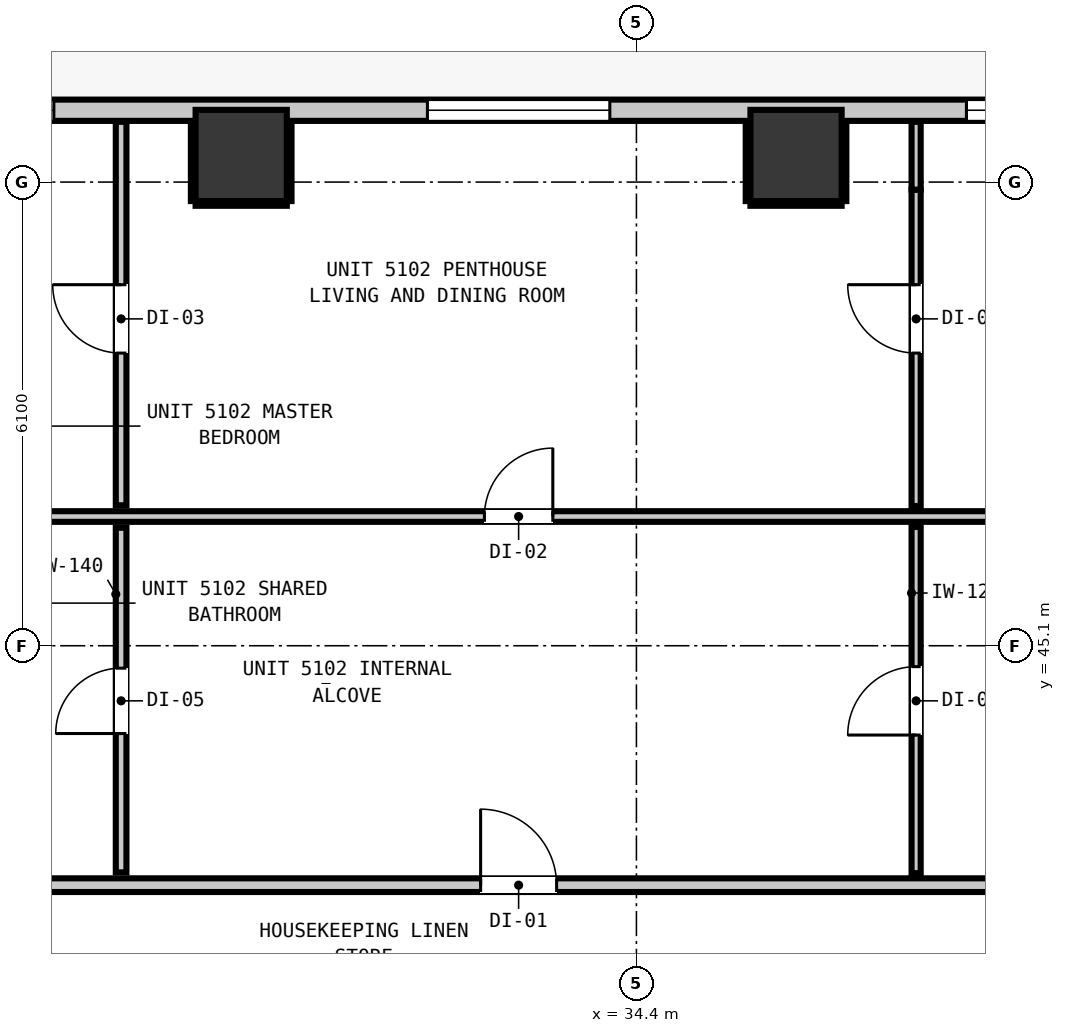
"""IFC4 building model, lengths in metres.
Left out: names, types, materials, properties, quantities, classifications, styles, units other than length and angle.
Written with IfcOpenShell. Run it as: python <this file> out.ifc"""

import sys

from ifc_helpers import new_model, si_unit, direction, frame, frame_2d, origin, origin_2d, place, context, subcontext, project, spatial, rectangle, extrude, element, fill, save


model = new_model("IFC4")
c1 = context("Model", 3, precision=1e-05, world=origin(), true_north=direction((0.0, 1.0)))
c2 = subcontext(c1, "Body", "Model", "MODEL_VIEW")
j1 = project(units=[si_unit("LENGTHUNIT", "METRE"), si_unit("PLANEANGLEUNIT", "RADIAN")], contexts=[c1])
p1 = place(None, origin())
s1 = spatial("IfcSite", under=j1, at=p1, CompositionType="ELEMENT")
p2 = place(p1, origin())
s2 = spatial("IfcBuilding", under=s1, at=p2, CompositionType="ELEMENT")
p3 = place(p2, frame((0.0, 0.0, 176.88)))
s3 = spatial("IfcBuildingStorey", under=s2, at=p3, CompositionType="ELEMENT", Elevation=176.88)
for number, where, z_axis, x_axis in (
    (1, (29.2, 51.55, 0.0), (0.0, 0.0, 1.0), (1.0, 0.0, 0.0)),
    (2, (36.5, 51.55, 0.0), (0.0, 0.0, 1.0), (1.0, 0.0, 0.0)),
):
    element("IfcColumn", number, at=place(p3, frame(where, z_axis=z_axis, x_axis=x_axis)), inside=s3, PredefinedType="COLUMN", context=c2, shape_type="SweptSolid", body=[
        extrude(rectangle(XDim=1.2, YDim=1.2, at=origin_2d()), origin(), (0.0, 0.0, 1.0), 3.32),
    ])
p4 = place(p3, frame((5.355, 52.145, 0.0), z_axis=(0.0, 0.0, 1.0), x_axis=(1.0, 0.0, 0.0)))
e3 = element("IfcWall", 3, at=p4, inside=s3, PredefinedType="STANDARD", context=c2, shape_type="SweptSolid", body=[
    extrude(rectangle(XDim=35.09, YDim=0.28, at=frame_2d((17.545, 0.0))), origin(), (0.0, 0.0, 1.0), 3.08),
])
p5 = place(p4, frame((0.904, 0.0, 0.0)))
e4 = element("IfcOpeningElement", 4, at=p5, cuts=e3, PredefinedType="OPENING", context=c2, shape_type="SweptSolid", body=[
    extrude(rectangle(XDim=1.0, YDim=2.15, at=frame_2d((0.5, 1.075))), frame((0.0, 0.15, 0.0), z_axis=(0.0, -1.0, 0.0), x_axis=(1.0, 0.0, 0.0)), (0.0, 0.0, 1.0), 0.3),
])
p6 = place(p4, frame((3.817, 0.0, 0.85)))
e5 = element("IfcOpeningElement", 5, at=p6, cuts=e3, PredefinedType="OPENING", context=c2, shape_type="SweptSolid", body=[
    extrude(rectangle(XDim=2.4, YDim=1.95, at=frame_2d((1.2, 0.975))), frame((0.0, 0.15, 0.0), z_axis=(0.0, -1.0, 0.0), x_axis=(1.0, 0.0, 0.0)), (0.0, 0.0, 1.0), 0.3),
])
p7 = place(p4, frame((16.495, 0.0, 0.85)))
e6 = element("IfcOpeningElement", 6, at=p7, cuts=e3, PredefinedType="OPENING", context=c2, shape_type="SweptSolid", body=[
    extrude(rectangle(XDim=2.4, YDim=1.95, at=frame_2d((1.2, 0.975))), frame((0.0, 0.15, 0.0), z_axis=(0.0, -1.0, 0.0), x_axis=(1.0, 0.0, 0.0)), (0.0, 0.0, 1.0), 0.3),
])
p8 = place(p4, frame((26.295, 0.0, 0.85)))
e7 = element("IfcOpeningElement", 7, at=p8, cuts=e3, PredefinedType="OPENING", context=c2, shape_type="SweptSolid", body=[
    extrude(rectangle(XDim=2.4, YDim=1.95, at=frame_2d((1.2, 0.975))), frame((0.0, 0.15, 0.0), z_axis=(0.0, -1.0, 0.0), x_axis=(1.0, 0.0, 0.0)), (0.0, 0.0, 1.0), 0.3),
])
p9 = place(p4, frame((20.33, 0.0, 0.85)))
e8 = element("IfcOpeningElement", 8, at=p9, cuts=e3, PredefinedType="OPENING", context=c2, shape_type="SweptSolid", body=[
    extrude(rectangle(XDim=1.05, YDim=1.65, at=frame_2d((0.525, 0.825))), frame((0.0, 0.15, 0.0), z_axis=(0.0, -1.0, 0.0), x_axis=(1.0, 0.0, 0.0)), (0.0, 0.0, 1.0), 0.3),
])
p10 = place(p4, frame((33.387, 0.0, 0.85)))
e9 = element("IfcOpeningElement", 9, at=p10, cuts=e3, PredefinedType="OPENING", context=c2, shape_type="SweptSolid", body=[
    extrude(rectangle(XDim=1.05, YDim=1.65, at=frame_2d((0.525, 0.825))), frame((0.0, 0.15, 0.0), z_axis=(0.0, -1.0, 0.0), x_axis=(1.0, 0.0, 0.0)), (0.0, 0.0, 1.0), 0.3),
])
p11 = place(p3, frame((3.207, 41.95, 0.0), z_axis=(0.0, 0.0, 1.0), x_axis=(1.0, 0.0, 0.0)))
e10 = element("IfcWall", 10, at=p11, inside=s3, PredefinedType="PARTITIONING", context=c2, shape_type="SweptSolid", body=[
    extrude(rectangle(XDim=39.386, YDim=0.18, at=frame_2d((19.693, 0.0))), origin(), (0.0, 0.0, 1.0), 3.08),
])
p12 = place(p11, frame((9.55, 0.0, 0.0)))
e11 = element("IfcOpeningElement", 11, at=p12, cuts=e10, PredefinedType="OPENING", context=c2, shape_type="SweptSolid", body=[
    extrude(rectangle(XDim=1.0, YDim=2.15, at=frame_2d((0.5, 1.075))), frame((0.0, 0.1, 0.0), z_axis=(0.0, -1.0, 0.0), x_axis=(1.0, 0.0, 0.0)), (0.0, 0.0, 1.0), 0.2),
])
p13 = place(p11, frame((29.143, 0.0, 0.0)))
e12 = element("IfcOpeningElement", 12, at=p13, cuts=e10, PredefinedType="OPENING", context=c2, shape_type="SweptSolid", body=[
    extrude(rectangle(XDim=1.0, YDim=2.15, at=frame_2d((0.5, 1.075))), frame((0.0, 0.1, 0.0), z_axis=(0.0, -1.0, 0.0), x_axis=(1.0, 0.0, 0.0)), (0.0, 0.0, 1.0), 0.2),
])
p14 = place(p3, frame((3.207, 46.8, 0.0), z_axis=(0.0, 0.0, 1.0), x_axis=(1.0, 0.0, 0.0)))
e13 = element("IfcWall", 13, at=p14, inside=s3, PredefinedType="PARTITIONING", context=c2, shape_type="SweptSolid", body=[
    extrude(rectangle(XDim=39.386, YDim=0.14, at=frame_2d((19.693, 0.0))), origin(), (0.0, 0.0, 1.0), 3.08),
])
p15 = place(p14, frame((9.6, 0.0, 0.0)))
e14 = element("IfcOpeningElement", 14, at=p15, cuts=e13, PredefinedType="OPENING", context=c2, shape_type="SweptSolid", body=[
    extrude(rectangle(XDim=0.9, YDim=2.1, at=frame_2d((0.45, 1.05))), frame((0.0, 0.08, 0.0), z_axis=(0.0, -1.0, 0.0), x_axis=(1.0, 0.0, 0.0)), (0.0, 0.0, 1.0), 0.16),
])
p16 = place(p14, frame((29.193, 0.0, 0.0)))
e15 = element("IfcOpeningElement", 15, at=p16, cuts=e13, PredefinedType="OPENING", context=c2, shape_type="SweptSolid", body=[
    extrude(rectangle(XDim=0.9, YDim=2.1, at=frame_2d((0.45, 1.05))), frame((0.0, 0.08, 0.0), z_axis=(0.0, -1.0, 0.0), x_axis=(1.0, 0.0, 0.0)), (0.0, 0.0, 1.0), 0.16),
])
p17 = place(p3, frame((27.62, 42.118, 0.0), z_axis=(0.0, 0.0, 1.0), x_axis=(0.0, 1.0, 0.0)))
e16 = element("IfcWall", 16, at=p17, inside=s3, PredefinedType="PARTITIONING", context=c2, shape_type="SweptSolid", body=[
    extrude(rectangle(XDim=4.534, YDim=0.14, at=frame_2d((2.267, 0.0))), origin(), (0.0, 0.0, 1.0), 3.08),
])
p18 = place(p17, frame((1.827, 0.0, 0.0)))
e17 = element("IfcOpeningElement", 17, at=p18, cuts=e16, PredefinedType="OPENING", context=c2, shape_type="SweptSolid", body=[
    extrude(rectangle(XDim=0.86, YDim=2.02, at=frame_2d((0.43, 1.01))), frame((0.0, 0.08, 0.0), z_axis=(0.0, -1.0, 0.0), x_axis=(1.0, 0.0, 0.0)), (0.0, 0.0, 1.0), 0.16),
])
p19 = place(p3, frame((27.62, 46.948, 0.0), z_axis=(0.0, 0.0, 1.0), x_axis=(0.0, 1.0, 0.0)))
e18 = element("IfcWall", 18, at=p19, inside=s3, PredefinedType="PARTITIONING", context=c2, shape_type="SweptSolid", body=[
    extrude(rectangle(XDim=5.045, YDim=0.14, at=frame_2d((2.522, 0.0))), origin(), (0.0, 0.0, 1.0), 3.08),
])
p20 = place(p19, frame((2.002, 0.0, 0.0)))
e19 = element("IfcOpeningElement", 19, at=p20, cuts=e18, PredefinedType="OPENING", context=c2, shape_type="SweptSolid", body=[
    extrude(rectangle(XDim=0.9, YDim=2.1, at=frame_2d((0.45, 1.05))), frame((0.0, 0.08, 0.0), z_axis=(0.0, -1.0, 0.0), x_axis=(1.0, 0.0, 0.0)), (0.0, 0.0, 1.0), 0.16),
])
p21 = place(p3, frame((38.08, 42.108, 0.0), z_axis=(0.0, 0.0, 1.0), x_axis=(0.0, 1.0, 0.0)))
e20 = element("IfcWall", 20, at=p21, inside=s3, PredefinedType="PARTITIONING", context=c2, shape_type="SweptSolid", body=[
    extrude(rectangle(XDim=4.554, YDim=0.12, at=frame_2d((2.277, 0.0))), origin(), (0.0, 0.0, 1.0), 3.08),
])
p22 = place(p21, frame((1.817, 0.0, 0.0)))
e21 = element("IfcOpeningElement", 21, at=p22, cuts=e20, PredefinedType="OPENING", context=c2, shape_type="SweptSolid", body=[
    extrude(rectangle(XDim=0.9, YDim=2.1, at=frame_2d((0.45, 1.05))), frame((0.0, 0.07, 0.0), z_axis=(0.0, -1.0, 0.0), x_axis=(1.0, 0.0, 0.0)), (0.0, 0.0, 1.0), 0.14),
])
p23 = place(p3, frame((38.08, 46.938, 0.0), z_axis=(0.0, 0.0, 1.0), x_axis=(0.0, 1.0, 0.0)))
e22 = element("IfcWall", 22, at=p23, inside=s3, PredefinedType="PARTITIONING", context=c2, shape_type="SweptSolid", body=[
    extrude(rectangle(XDim=4.162, YDim=0.12, at=frame_2d((2.081, 0.0))), origin(), (0.0, 0.0, 1.0), 2.565),
])
p24 = place(p23, frame((2.012, 0.0, 0.0)))
e23 = element("IfcOpeningElement", 23, at=p24, cuts=e22, PredefinedType="OPENING", context=c2, shape_type="SweptSolid", body=[
    extrude(rectangle(XDim=0.9, YDim=2.1, at=frame_2d((0.45, 1.05))), frame((0.0, 0.07, 0.0), z_axis=(0.0, -1.0, 0.0), x_axis=(1.0, 0.0, 0.0)), (0.0, 0.0, 1.0), 0.14),
])
p25 = place(p3, frame((38.08, 51.1, 0.0), z_axis=(0.0, 0.0, 1.0), x_axis=(0.0, 1.0, 0.0)))
e24 = element("IfcWall", 24, at=p25, inside=s3, PredefinedType="PARTITIONING", context=c2, shape_type="SweptSolid", body=[
    extrude(rectangle(XDim=0.893, YDim=0.12, at=frame_2d((0.446, 0.0))), origin(), (0.0, 0.0, 1.0), 3.08),
])
p26 = place(p3, frame((28.6, 50.918, 0.0), z_axis=(0.0, 0.0, 1.0), x_axis=(1.0, 0.0, 0.0)))
e25 = element("IfcWall", 25, at=p26, inside=s3, PredefinedType="PARTITIONING", context=c2, shape_type="SweptSolid", body=[
    extrude(rectangle(XDim=1.2, YDim=0.06, at=frame_2d((0.6, 0.0))), origin(), (0.0, 0.0, 1.0), 1.45),
])
for number, where, z_axis, x_axis in (
    (26, (28.568, 50.95, 0.0), (0.0, 0.0, 1.0), (0.0, 1.0, 0.0)),
    (27, (29.832, 50.95, 0.0), (0.0, 0.0, 1.0), (0.0, 1.0, 0.0)),
):
    element("IfcWall", number, at=place(p3, frame(where, z_axis=z_axis, x_axis=x_axis)), inside=s3, PredefinedType="PARTITIONING", context=c2, shape_type="SweptSolid", body=[
        extrude(rectangle(XDim=1.04, YDim=0.06, at=frame_2d((0.52, 0.0))), origin(), (0.0, 0.0, 1.0), 1.45),
    ])
p27 = place(p3, frame((35.9, 50.918, 0.0), z_axis=(0.0, 0.0, 1.0), x_axis=(1.0, 0.0, 0.0)))
e28 = element("IfcWall", 28, at=p27, inside=s3, PredefinedType="PARTITIONING", context=c2, shape_type="SweptSolid", body=[
    extrude(rectangle(XDim=1.2, YDim=0.06, at=frame_2d((0.6, 0.0))), origin(), (0.0, 0.0, 1.0), 1.45),
])
for number, where, z_axis, x_axis in (
    (29, (35.868, 50.95, 0.0), (0.0, 0.0, 1.0), (0.0, 1.0, 0.0)),
    (30, (37.132, 50.95, 0.0), (0.0, 0.0, 1.0), (0.0, 1.0, 0.0)),
):
    element("IfcWall", number, at=place(p3, frame(where, z_axis=z_axis, x_axis=x_axis)), inside=s3, PredefinedType="PARTITIONING", context=c2, shape_type="SweptSolid", body=[
        extrude(rectangle(XDim=1.04, YDim=0.06, at=frame_2d((0.52, 0.0))), origin(), (0.0, 0.0, 1.0), 1.45),
    ])
p28 = place(p8, origin())
e31 = element("IfcWindow", 31, at=p28, inside=s3, PartitioningType="SINGLE_PANEL", PredefinedType="WINDOW", context=c2, shape_type="SweptSolid", body=[
    extrude(rectangle(XDim=2.4, YDim=1.95, at=frame_2d((1.2, 0.975))), frame((0.0, 0.03, 0.0), z_axis=(0.0, -1.0, 0.0), x_axis=(1.0, 0.0, 0.0)), (0.0, 0.0, 1.0), 0.06),
])
fill(e7, e31)
p29 = place(p9, origin())
e32 = element("IfcWindow", 32, at=p29, inside=s3, PartitioningType="SINGLE_PANEL", PredefinedType="WINDOW", context=c2, shape_type="SweptSolid", body=[
    extrude(rectangle(XDim=1.05, YDim=1.65, at=frame_2d((0.525, 0.825))), frame((0.0, 0.03, 0.0), z_axis=(0.0, -1.0, 0.0), x_axis=(1.0, 0.0, 0.0)), (0.0, 0.0, 1.0), 0.06),
])
fill(e8, e32)
p30 = place(p10, origin())
e33 = element("IfcWindow", 33, at=p30, inside=s3, PartitioningType="SINGLE_PANEL", PredefinedType="WINDOW", context=c2, shape_type="SweptSolid", body=[
    extrude(rectangle(XDim=1.05, YDim=1.65, at=frame_2d((0.525, 0.825))), frame((0.0, 0.03, 0.0), z_axis=(0.0, -1.0, 0.0), x_axis=(1.0, 0.0, 0.0)), (0.0, 0.0, 1.0), 0.06),
])
fill(e9, e33)
p31 = place(p13, origin())
e34 = element("IfcDoor", 34, at=p31, inside=s3, OperationType="SINGLE_SWING_LEFT", PredefinedType="DOOR", context=c2, shape_type="SweptSolid", body=[
    extrude(rectangle(XDim=1.0, YDim=2.15, at=frame_2d((0.5, 1.075))), frame((0.0, 0.025, 0.0), z_axis=(0.0, -1.0, 0.0), x_axis=(1.0, 0.0, 0.0)), (0.0, 0.0, 1.0), 0.05),
])
fill(e12, e34)
p32 = place(p16, origin())
e35 = element("IfcDoor", 35, at=p32, inside=s3, OperationType="SINGLE_SWING_RIGHT", PredefinedType="DOOR", context=c2, shape_type="SweptSolid", body=[
    extrude(rectangle(XDim=0.9, YDim=2.1, at=frame_2d((0.45, 1.05))), frame((0.0, 0.025, 0.0), z_axis=(0.0, -1.0, 0.0), x_axis=(1.0, 0.0, 0.0)), (0.0, 0.0, 1.0), 0.05),
])
fill(e15, e35)
p33 = place(p18, origin())
e36 = element("IfcDoor", 36, at=p33, inside=s3, OperationType="SINGLE_SWING_LEFT", PredefinedType="DOOR", context=c2, shape_type="SweptSolid", body=[
    extrude(rectangle(XDim=0.86, YDim=2.02, at=frame_2d((0.43, 1.01))), frame((0.0, 0.025, 0.0), z_axis=(0.0, -1.0, 0.0), x_axis=(1.0, 0.0, 0.0)), (0.0, 0.0, 1.0), 0.05),
])
fill(e17, e36)
p34 = place(p20, origin())
e37 = element("IfcDoor", 37, at=p34, inside=s3, OperationType="SINGLE_SWING_RIGHT", PredefinedType="DOOR", context=c2, shape_type="SweptSolid", body=[
    extrude(rectangle(XDim=0.9, YDim=2.1, at=frame_2d((0.45, 1.05))), frame((0.0, 0.025, 0.0), z_axis=(0.0, -1.0, 0.0), x_axis=(1.0, 0.0, 0.0)), (0.0, 0.0, 1.0), 0.05),
])
fill(e19, e37)
p35 = place(p22, origin())
e38 = element("IfcDoor", 38, at=p35, inside=s3, OperationType="SINGLE_SWING_LEFT", PredefinedType="DOOR", context=c2, shape_type="SweptSolid", body=[
    extrude(rectangle(XDim=0.9, YDim=2.1, at=frame_2d((0.45, 1.05))), frame((0.0, 0.025, 0.0), z_axis=(0.0, -1.0, 0.0), x_axis=(1.0, 0.0, 0.0)), (0.0, 0.0, 1.0), 0.05),
])
fill(e21, e38)
p36 = place(p24, origin())
e39 = element("IfcDoor", 39, at=p36, inside=s3, OperationType="SINGLE_SWING_RIGHT", PredefinedType="DOOR", context=c2, shape_type="SweptSolid", body=[
    extrude(rectangle(XDim=0.9, YDim=2.1, at=frame_2d((0.45, 1.05))), frame((0.0, 0.025, 0.0), z_axis=(0.0, -1.0, 0.0), x_axis=(1.0, 0.0, 0.0)), (0.0, 0.0, 1.0), 0.05),
])
fill(e23, e39)
save(model, sys.argv[1])
